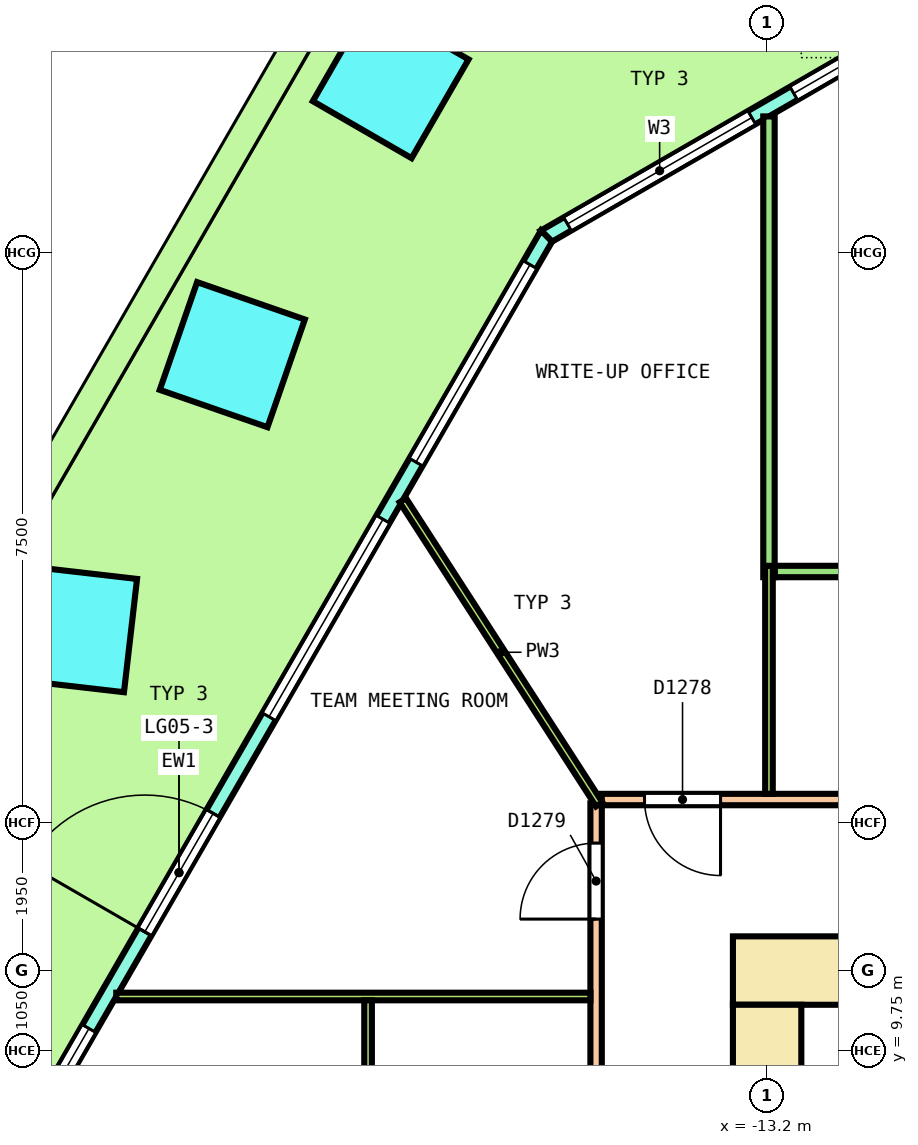
"""IFC4 building model, lengths in metres.
Left out: names, types, materials, properties, quantities, classifications, styles, units other than length and angle.
Written with IfcOpenShell. Run it as: python <this file> out.ifc"""

import sys

from ifc_helpers import new_model, si_unit, direction, frame, frame_2d, origin, origin_2d, place, context, subcontext, project, spatial, polyline, rectangle, outline, extrude, element, fill, save


model = new_model("IFC4")
c1 = context("Model", 3, precision=1e-05, world=origin(), true_north=direction((0.0, 1.0)))
c2 = subcontext(c1, "Body", "Model", "MODEL_VIEW")
j1 = project(units=[si_unit("LENGTHUNIT", "METRE"), si_unit("PLANEANGLEUNIT", "RADIAN")], contexts=[c1])
p1 = place(None, origin())
s1 = spatial("IfcSite", under=j1, at=p1, CompositionType="ELEMENT")
p2 = place(p1, origin())
s2 = spatial("IfcBuilding", under=s1, at=p2, CompositionType="ELEMENT")
p3 = place(p2, frame((0.0, 0.0, 23.4)))
s3 = spatial("IfcBuildingStorey", under=s2, at=p3, CompositionType="ELEMENT", Elevation=23.4)
p4 = place(p3, frame((-18.152, 22.512, 0.0), z_axis=(-0.036265236264, 0.0, 0.999342199969), x_axis=(-0.499424867419, -0.866167613071, -0.018123682572)))
e1 = element("IfcColumn", 1, at=p4, inside=s3, PredefinedType="COLUMN", context=c2, shape_type="SweptSolid", body=[
    extrude(rectangle(XDim=1.5, YDim=1.5, at=origin_2d()), origin(), (0.0, 0.0, 1.0), 4.053),
])
p5 = place(p3, frame((-20.236, 18.903, 0.0), z_axis=(-0.032654187208, 0.006265748099, 0.999447069363), x_axis=(-0.499519823947, -0.866234008258, -0.010889831076)))
e2 = element("IfcColumn", 2, at=p5, inside=s3, PredefinedType="COLUMN", context=c2, shape_type="SweptSolid", body=[
    extrude(rectangle(XDim=1.5, YDim=1.5, at=origin_2d()), origin(), (0.0, 0.0, 1.0), 4.052),
])
p6 = place(p3, frame((-22.32, 15.293, 0.0), z_axis=(-0.029040860623, 0.012532155622, 0.999499661576), x_axis=(-0.498795158794, -0.866712319891, -0.003625480981)))
e3 = element("IfcColumn", 3, at=p6, inside=s3, PredefinedType="COLUMN", context=c2, shape_type="SweptSolid", body=[
    extrude(rectangle(XDim=1.5, YDim=1.5, at=origin_2d()), origin(), (0.0, 0.0, 1.0), 4.052),
])
p7 = place(p3, frame((-10.149, 23.9, 0.0), z_axis=(0.0, 0.0, 1.0), x_axis=(-0.866029458321, -0.49999297727, 0.0)))
e4 = element("IfcWall", 4, at=p7, inside=s3, PredefinedType="SOLIDWALL", context=c2, shape_type="SweptSolid", body=[
    extrude(outline(polyline([(-0.027, -0.1), (1.128, -0.1), (2.282, -0.1), (3.437, -0.1), (4.592, -0.1), (5.747, -0.1), (6.901, -0.1), (6.848, 0.1), (5.711, 0.1), (4.574, 0.1), (3.437, 0.1), (2.301, 0.1), (1.164, 0.1), (0.027, 0.1), (-0.027, -0.1)])), origin(), (0.0, 0.0, 1.0), 4.1),
])
p8 = place(p7, frame((0.319, 0.0, 0.1)))
e5 = element("IfcOpeningElement", 5, at=p8, cuts=e4, PredefinedType="OPENING", context=c2, shape_type="SweptSolid", body=[
    extrude(rectangle(XDim=2.8, YDim=2.9, at=frame_2d((1.4, 1.45))), frame((0.0, 0.11, 0.0), z_axis=(0.0, -1.0, 0.0), x_axis=(1.0, 0.0, 0.0)), (0.0, 0.0, 1.0), 0.22),
])
p9 = place(p7, frame((3.756, 0.0, 0.1)))
e6 = element("IfcOpeningElement", 6, at=p9, cuts=e4, PredefinedType="OPENING", context=c2, shape_type="SweptSolid", body=[
    extrude(rectangle(XDim=2.8, YDim=2.9, at=frame_2d((1.4, 1.45))), frame((0.0, 0.11, 0.0), z_axis=(0.0, -1.0, 0.0), x_axis=(1.0, 0.0, 0.0)), (0.0, 0.0, 1.0), 0.22),
])
p10 = place(p3, frame((-16.103, 20.463, 0.0), z_axis=(0.0, 0.0, 1.0), x_axis=(-0.500000373815, -0.866025187962, 0.0)))
e7 = element("IfcWall", 7, at=p10, inside=s3, PredefinedType="SOLIDWALL", context=c2, shape_type="SweptSolid", body=[
    extrude(outline(polyline([(-0.027, -0.1), (0.994, -0.1), (2.015, -0.1), (3.035, -0.1), (4.056, -0.1), (5.077, -0.1), (6.097, -0.1), (7.118, -0.1), (8.139, -0.1), (9.16, -0.1), (10.18, -0.1), (11.201, -0.1), (12.222, -0.1), (13.242, -0.1), (14.263, -0.1), (15.284, -0.1), (16.304, -0.1), (17.325, -0.1), (18.346, -0.1), (19.367, -0.1), (19.313, 0.1), (18.298, 0.1), (17.283, 0.1), (16.268, 0.1), (15.253, 0.1), (14.238, 0.1), (13.223, 0.1), (12.208, 0.1), (11.193, 0.1), (10.177, 0.1), (9.162, 0.1), (8.147, 0.1), (7.132, 0.1), (6.117, 0.1), (5.102, 0.1), (4.087, 0.1), (3.072, 0.1), (2.057, 0.1), (1.042, 0.1), (0.027, 0.1), (-0.027, -0.1)])), origin(), (0.0, 0.0, 1.0), 4.1),
])
p11 = place(p10, frame((0.434, 0.0, 0.1)))
e8 = element("IfcOpeningElement", 8, at=p11, cuts=e7, PredefinedType="OPENING", context=c2, shape_type="SweptSolid", body=[
    extrude(rectangle(XDim=3.0, YDim=2.9, at=frame_2d((1.5, 1.45))), frame((0.0, 0.11, 0.0), z_axis=(0.0, -1.0, 0.0), x_axis=(1.0, 0.0, 0.0)), (0.0, 0.0, 1.0), 0.22),
])
p12 = place(p10, frame((4.302, 0.0, 0.1)))
e9 = element("IfcOpeningElement", 9, at=p12, cuts=e7, PredefinedType="OPENING", context=c2, shape_type="SweptSolid", body=[
    extrude(rectangle(XDim=3.0, YDim=2.9, at=frame_2d((1.5, 1.45))), frame((0.0, 0.11, 0.0), z_axis=(0.0, -1.0, 0.0), x_axis=(1.0, 0.0, 0.0)), (0.0, 0.0, 1.0), 0.22),
])
p13 = place(p10, frame((8.77, 0.0, 0.0)))
e10 = element("IfcOpeningElement", 10, at=p13, cuts=e7, PredefinedType="OPENING", context=c2, shape_type="SweptSolid", body=[
    extrude(rectangle(XDim=1.8, YDim=2.4, at=frame_2d((0.9, 1.2))), frame((0.0, 0.11, 0.0), z_axis=(0.0, -1.0, 0.0), x_axis=(1.0, 0.0, 0.0)), (0.0, 0.0, 1.0), 0.22),
])
p14 = place(p10, frame((8.77, 0.0, 2.55)))
e11 = element("IfcOpeningElement", 11, at=p14, cuts=e7, PredefinedType="OPENING", context=c2, shape_type="SweptSolid", body=[
    extrude(rectangle(XDim=1.8, YDim=0.45, at=frame_2d((0.9, 0.225))), frame((0.0, 0.11, 0.0), z_axis=(0.0, -1.0, 0.0), x_axis=(1.0, 0.0, 0.0)), (0.0, 0.0, 1.0), 0.22),
])
p15 = place(p10, frame((12.038, 0.0, 0.1)))
e12 = element("IfcOpeningElement", 12, at=p15, cuts=e7, PredefinedType="OPENING", context=c2, shape_type="SweptSolid", body=[
    extrude(rectangle(XDim=3.0, YDim=2.9, at=frame_2d((1.5, 1.45))), frame((0.0, 0.11, 0.0), z_axis=(0.0, -1.0, 0.0), x_axis=(1.0, 0.0, 0.0)), (0.0, 0.0, 1.0), 0.22),
])
p16 = place(p10, frame((15.906, 0.0, 0.1)))
e13 = element("IfcOpeningElement", 13, at=p16, cuts=e7, PredefinedType="OPENING", context=c2, shape_type="SweptSolid", body=[
    extrude(rectangle(XDim=3.0, YDim=2.9, at=frame_2d((1.5, 1.45))), frame((0.0, 0.11, 0.0), z_axis=(0.0, -1.0, 0.0), x_axis=(1.0, 0.0, 0.0)), (0.0, 0.0, 1.0), 0.22),
])
p17 = place(p3, frame((-13.65, 10.8, 0.0), z_axis=(0.0, 0.0, 1.0), x_axis=(1.0, 0.0, 0.0)))
e14 = element("IfcWall", 14, at=p17, inside=s3, PredefinedType="SHEAR", context=c2, shape_type="SweptSolid", body=[
    extrude(rectangle(XDim=27.3, YDim=0.9, at=frame_2d((13.65, 0.0))), origin(), (0.0, 0.0, 1.0), 4.1),
])
p18 = place(p17, frame((1.892, 0.0, 0.0)))
e15 = element("IfcOpeningElement", 15, at=p18, cuts=e14, PredefinedType="OPENING", context=c2, shape_type="SweptSolid", body=[
    extrude(rectangle(XDim=1.0, YDim=2.1, at=frame_2d((0.5, 1.05))), frame((0.0, 0.46, 0.0), z_axis=(0.0, -1.0, 0.0), x_axis=(1.0, 0.0, 0.0)), (0.0, 0.0, 1.0), 0.92),
])
p19 = place(p17, frame((4.97, 0.0, 0.0)))
e16 = element("IfcOpeningElement", 16, at=p19, cuts=e14, PredefinedType="OPENING", context=c2, shape_type="SweptSolid", body=[
    extrude(rectangle(XDim=1.0, YDim=2.1, at=frame_2d((0.5, 1.05))), frame((0.0, 0.46, 0.0), z_axis=(0.0, -1.0, 0.0), x_axis=(1.0, 0.0, 0.0)), (0.0, 0.0, 1.0), 0.92),
])
p20 = place(p17, frame((8.017, 0.0, 0.0)))
e17 = element("IfcOpeningElement", 17, at=p20, cuts=e14, PredefinedType="OPENING", context=c2, shape_type="SweptSolid", body=[
    extrude(rectangle(XDim=1.0, YDim=2.1, at=frame_2d((0.5, 1.05))), frame((0.0, 0.46, 0.0), z_axis=(0.0, -1.0, 0.0), x_axis=(1.0, 0.0, 0.0)), (0.0, 0.0, 1.0), 0.92),
])
p21 = place(p17, frame((11.064, 0.0, 0.0)))
e18 = element("IfcOpeningElement", 18, at=p21, cuts=e14, PredefinedType="OPENING", context=c2, shape_type="SweptSolid", body=[
    extrude(rectangle(XDim=1.0, YDim=2.1, at=frame_2d((0.5, 1.05))), frame((0.0, 0.46, 0.0), z_axis=(0.0, -1.0, 0.0), x_axis=(1.0, 0.0, 0.0)), (0.0, 0.0, 1.0), 0.92),
])
p22 = place(p17, frame((18.077, 0.0, 0.0)))
e19 = element("IfcOpeningElement", 19, at=p22, cuts=e14, PredefinedType="OPENING", context=c2, shape_type="SweptSolid", body=[
    extrude(rectangle(XDim=1.0, YDim=2.1, at=frame_2d((0.5, 1.05))), frame((0.0, 0.46, 0.0), z_axis=(0.0, -1.0, 0.0), x_axis=(1.0, 0.0, 0.0)), (0.0, 0.0, 1.0), 0.92),
])
p23 = place(p17, frame((21.206, 0.0, 0.0)))
e20 = element("IfcOpeningElement", 20, at=p23, cuts=e14, PredefinedType="OPENING", context=c2, shape_type="SweptSolid", body=[
    extrude(rectangle(XDim=1.0, YDim=2.1, at=frame_2d((0.5, 1.05))), frame((0.0, 0.46, 0.0), z_axis=(0.0, -1.0, 0.0), x_axis=(1.0, 0.0, 0.0)), (0.0, 0.0, 1.0), 0.92),
])
p24 = place(p17, frame((24.367, 0.0, 0.0)))
e21 = element("IfcOpeningElement", 21, at=p24, cuts=e14, PredefinedType="OPENING", context=c2, shape_type="SweptSolid", body=[
    extrude(rectangle(XDim=1.0, YDim=2.1, at=frame_2d((0.5, 1.05))), frame((0.0, 0.46, 0.0), z_axis=(0.0, -1.0, 0.0), x_axis=(1.0, 0.0, 0.0)), (0.0, 0.0, 1.0), 0.92),
])
p25 = place(p17, frame((14.575, 0.0, 0.0)))
e22 = element("IfcOpeningElement", 22, at=p25, cuts=e14, PredefinedType="OPENING", context=c2, shape_type="SweptSolid", body=[
    extrude(rectangle(XDim=1.4, YDim=2.1, at=frame_2d((0.7, 1.05))), frame((0.0, 0.46, 0.0), z_axis=(0.0, -1.0, 0.0), x_axis=(1.0, 0.0, 0.0)), (0.0, 0.0, 1.0), 0.92),
])
p26 = place(p3, frame((-13.2, -10.35, 0.0), z_axis=(0.0, 0.0, 1.0), x_axis=(0.0, 1.0, 0.0)))
e23 = element("IfcWall", 23, at=p26, inside=s3, PredefinedType="SHEAR", context=c2, shape_type="SweptSolid", body=[
    extrude(rectangle(XDim=20.7, YDim=0.9, at=frame_2d((10.35, 0.0))), origin(), (0.0, 0.0, 1.0), 4.1),
])
p27 = place(p26, frame((9.15, 0.0, 0.0)))
e24 = element("IfcOpeningElement", 24, at=p27, cuts=e23, PredefinedType="OPENING", context=c2, shape_type="SweptSolid", body=[
    extrude(rectangle(XDim=2.4, YDim=2.1, at=frame_2d((1.2, 1.05))), frame((0.0, 0.46, 0.0), z_axis=(0.0, -1.0, 0.0), x_axis=(1.0, 0.0, 0.0)), (0.0, 0.0, 1.0), 0.92),
])
p28 = place(p26, frame((16.05, 0.0, 0.0)))
e25 = element("IfcOpeningElement", 25, at=p28, cuts=e23, PredefinedType="OPENING", context=c2, shape_type="SweptSolid", body=[
    extrude(rectangle(XDim=1.2, YDim=2.1, at=frame_2d((0.6, 1.05))), frame((0.0, 0.46, 0.0), z_axis=(0.0, -1.0, 0.0), x_axis=(1.0, 0.0, 0.0)), (0.0, 0.0, 1.0), 0.92),
])
p29 = place(p26, frame((3.45, 0.0, 0.0)))
e26 = element("IfcOpeningElement", 26, at=p29, cuts=e23, PredefinedType="OPENING", context=c2, shape_type="SweptSolid", body=[
    extrude(rectangle(XDim=1.2, YDim=2.1, at=frame_2d((0.6, 1.05))), frame((0.0, 0.46, 0.0), z_axis=(0.0, -1.0, 0.0), x_axis=(1.0, 0.0, 0.0)), (0.0, 0.0, 1.0), 0.92),
])
p30 = place(p3, frame((-15.375, 13.05, 0.0), z_axis=(0.0, 0.0, 1.0), x_axis=(1.0, 0.0, 0.0)))
e27 = element("IfcWall", 27, at=p30, inside=s3, PredefinedType="PARTITIONING", context=c2, shape_type="SweptSolid", body=[
    extrude(rectangle(XDim=30.75, YDim=0.15, at=frame_2d((15.375, 0.0))), origin(), (0.0, 0.0, 1.0), 3.05),
])
p31 = place(p30, frame((28.224, 0.0, 0.0)))
e28 = element("IfcOpeningElement", 28, at=p31, cuts=e27, PredefinedType="OPENING", context=c2, shape_type="SweptSolid", body=[
    extrude(rectangle(XDim=1.0, YDim=2.1, at=frame_2d((0.5, 1.05))), frame((0.0, 0.085, 0.0), z_axis=(0.0, -1.0, 0.0), x_axis=(1.0, 0.0, 0.0)), (0.0, 0.0, 1.0), 0.17),
])
p32 = place(p30, frame((23.241, 0.0, 0.0)))
e29 = element("IfcOpeningElement", 29, at=p32, cuts=e27, PredefinedType="OPENING", context=c2, shape_type="SweptSolid", body=[
    extrude(rectangle(XDim=1.2, YDim=2.1, at=frame_2d((0.6, 1.05))), frame((0.0, 0.085, 0.0), z_axis=(0.0, -1.0, 0.0), x_axis=(1.0, 0.0, 0.0)), (0.0, 0.0, 1.0), 0.17),
])
p33 = place(p30, frame((17.746, 0.0, 0.0)))
e30 = element("IfcOpeningElement", 30, at=p33, cuts=e27, PredefinedType="OPENING", context=c2, shape_type="SweptSolid", body=[
    extrude(rectangle(XDim=1.2, YDim=2.1, at=frame_2d((0.6, 1.05))), frame((0.0, 0.085, 0.0), z_axis=(0.0, -1.0, 0.0), x_axis=(1.0, 0.0, 0.0)), (0.0, 0.0, 1.0), 0.17),
])
p34 = place(p30, frame((11.247, 0.0, 0.0)))
e31 = element("IfcOpeningElement", 31, at=p34, cuts=e27, PredefinedType="OPENING", context=c2, shape_type="SweptSolid", body=[
    extrude(rectangle(XDim=1.2, YDim=2.1, at=frame_2d((0.6, 1.05))), frame((0.0, 0.085, 0.0), z_axis=(0.0, -1.0, 0.0), x_axis=(1.0, 0.0, 0.0)), (0.0, 0.0, 1.0), 0.17),
])
p35 = place(p30, frame((6.577, 0.0, 0.0)))
e32 = element("IfcOpeningElement", 32, at=p35, cuts=e27, PredefinedType="OPENING", context=c2, shape_type="SweptSolid", body=[
    extrude(rectangle(XDim=1.0, YDim=2.1, at=frame_2d((0.5, 1.05))), frame((0.0, 0.085, 0.0), z_axis=(0.0, -1.0, 0.0), x_axis=(1.0, 0.0, 0.0)), (0.0, 0.0, 1.0), 0.17),
])
p36 = place(p30, frame((0.562, 0.0, 0.0)))
e33 = element("IfcOpeningElement", 33, at=p36, cuts=e27, PredefinedType="OPENING", context=c2, shape_type="SweptSolid", body=[
    extrude(rectangle(XDim=1.0, YDim=2.1, at=frame_2d((0.5, 1.05))), frame((0.0, 0.085, 0.0), z_axis=(0.0, -1.0, 0.0), x_axis=(1.0, 0.0, 0.0)), (0.0, 0.0, 1.0), 0.17),
])
p37 = place(p3, frame((-15.45, -12.975, 0.0), z_axis=(0.0, 0.0, 1.0), x_axis=(0.0, 1.0, 0.0)))
e34 = element("IfcWall", 34, at=p37, inside=s3, PredefinedType="PARTITIONING", context=c2, shape_type="SweptSolid", body=[
    extrude(rectangle(XDim=25.975, YDim=0.15, at=frame_2d((12.988, 0.0))), origin(), (0.0, 0.0, 1.0), 3.05),
])
p38 = place(p37, frame((24.452, 0.0, 0.0)))
e35 = element("IfcOpeningElement", 35, at=p38, cuts=e34, PredefinedType="OPENING", context=c2, shape_type="SweptSolid", body=[
    extrude(rectangle(XDim=1.0, YDim=2.1, at=frame_2d((0.5, 1.05))), frame((0.0, 0.085, 0.0), z_axis=(0.0, -1.0, 0.0), x_axis=(1.0, 0.0, 0.0)), (0.0, 0.0, 1.0), 0.17),
])
p39 = place(p37, frame((15.722, 0.0, 0.0)))
e36 = element("IfcOpeningElement", 36, at=p39, cuts=e34, PredefinedType="OPENING", context=c2, shape_type="SweptSolid", body=[
    extrude(rectangle(XDim=1.0, YDim=2.1, at=frame_2d((0.5, 1.05))), frame((0.0, 0.085, 0.0), z_axis=(0.0, -1.0, 0.0), x_axis=(1.0, 0.0, 0.0)), (0.0, 0.0, 1.0), 0.17),
])
p40 = place(p37, frame((7.494, 0.0, 0.0)))
e37 = element("IfcOpeningElement", 37, at=p40, cuts=e34, PredefinedType="OPENING", context=c2, shape_type="SweptSolid", body=[
    extrude(rectangle(XDim=1.0, YDim=2.1, at=frame_2d((0.5, 1.05))), frame((0.0, 0.085, 0.0), z_axis=(0.0, -1.0, 0.0), x_axis=(1.0, 0.0, 0.0)), (0.0, 0.0, 1.0), 0.17),
])
p41 = place(p37, frame((0.664, 0.0, 0.0)))
e38 = element("IfcOpeningElement", 38, at=p41, cuts=e34, PredefinedType="OPENING", context=c2, shape_type="SweptSolid", body=[
    extrude(rectangle(XDim=1.0, YDim=2.1, at=frame_2d((0.5, 1.05))), frame((0.0, 0.085, 0.0), z_axis=(0.0, -1.0, 0.0), x_axis=(1.0, 0.0, 0.0)), (0.0, 0.0, 1.0), 0.17),
])
p42 = place(p3, frame((-13.101, 16.05, 0.0), z_axis=(0.0, 0.0, 1.0), x_axis=(1.0, 0.0, 0.0)))
e39 = element("IfcWall", 39, at=p42, inside=s3, PredefinedType="PARTITIONING", context=c2, shape_type="SweptSolid", body=[
    extrude(rectangle(XDim=6.92, YDim=0.15, at=frame_2d((3.46, 0.0))), origin(), (0.0, 0.0, 1.0), 3.05),
])
p43 = place(p3, frame((-13.176, 15.975, 0.0), z_axis=(0.0, 0.0, 1.0), x_axis=(0.0, 1.0, 0.0)))
e40 = element("IfcWall", 40, at=p43, inside=s3, PredefinedType="PARTITIONING", context=c2, shape_type="SweptSolid", body=[
    extrude(rectangle(XDim=6.062, YDim=0.15, at=frame_2d((3.031, 0.0))), origin(), (0.0, 0.0, 1.0), 3.05),
])
p44 = place(p3, frame((-13.176, 13.125, 0.0), z_axis=(0.0, 0.0, 1.0), x_axis=(0.0, 1.0, 0.0)))
e41 = element("IfcWall", 41, at=p44, inside=s3, PredefinedType="PARTITIONING", context=c2, shape_type="SweptSolid", body=[
    extrude(rectangle(XDim=3.0, YDim=0.1, at=frame_2d((1.5, 0.0))), origin(), (0.0, 0.0, 1.0), 3.05),
])
p45 = place(p3, frame((-17.993, 16.988, 0.0), z_axis=(0.0, 0.0, 1.0), x_axis=(0.542528445802, -0.840037431009, 0.0)))
e42 = element("IfcWall", 42, at=p45, inside=s3, PredefinedType="PARTITIONING", context=c2, shape_type="SweptSolid", body=[
    extrude(rectangle(XDim=4.763, YDim=0.1, at=frame_2d((2.381, 0.0))), origin(), (0.0, 0.0, 1.0), 3.05),
])
p46 = place(p3, frame((-21.763, 10.459, 0.0), z_axis=(0.0, 0.0, 1.0), x_axis=(1.0, 0.0, 0.0)))
e43 = element("IfcWall", 43, at=p46, inside=s3, PredefinedType="PARTITIONING", context=c2, shape_type="SweptSolid", body=[
    extrude(rectangle(XDim=6.238, YDim=0.1, at=frame_2d((3.119, 0.0))), origin(), (0.0, 0.0, 1.0), 3.05),
])
p47 = place(p3, frame((-18.45, 0.327, 0.0), z_axis=(0.0, 0.0, 1.0), x_axis=(0.0, 1.0, 0.0)))
e44 = element("IfcWall", 44, at=p47, inside=s3, PredefinedType="PARTITIONING", context=c2, shape_type="SweptSolid", body=[
    extrude(rectangle(XDim=10.082, YDim=0.1, at=frame_2d((5.041, 0.0))), origin(), (0.0, 0.0, 1.0), 3.05),
])
p48 = place(p47, frame((6.512, 0.0, 0.0)))
e45 = element("IfcOpeningElement", 45, at=p48, cuts=e44, PredefinedType="OPENING", context=c2, shape_type="SweptSolid", body=[
    extrude(rectangle(XDim=1.2, YDim=2.1, at=frame_2d((0.6, 1.05))), frame((0.0, 0.06, 0.0), z_axis=(0.0, -1.0, 0.0), x_axis=(1.0, 0.0, 0.0)), (0.0, 0.0, 1.0), 0.12),
])
p49 = place(p8, origin())
e46 = element("IfcWindow", 46, at=p49, inside=s3, PartitioningType="SINGLE_PANEL", PredefinedType="WINDOW", context=c2, shape_type="SweptSolid", body=[
    extrude(rectangle(XDim=2.8, YDim=2.9, at=frame_2d((1.4, 1.45))), frame((0.0, 0.03, 0.0), z_axis=(0.0, -1.0, 0.0), x_axis=(1.0, 0.0, 0.0)), (0.0, 0.0, 1.0), 0.06),
])
fill(e5, e46)
p50 = place(p9, origin())
e47 = element("IfcWindow", 47, at=p50, inside=s3, PartitioningType="SINGLE_PANEL", PredefinedType="WINDOW", context=c2, shape_type="SweptSolid", body=[
    extrude(rectangle(XDim=2.8, YDim=2.9, at=frame_2d((1.4, 1.45))), frame((0.0, 0.03, 0.0), z_axis=(0.0, -1.0, 0.0), x_axis=(1.0, 0.0, 0.0)), (0.0, 0.0, 1.0), 0.06),
])
fill(e6, e47)
p51 = place(p11, origin())
e48 = element("IfcWindow", 48, at=p51, inside=s3, PartitioningType="SINGLE_PANEL", PredefinedType="WINDOW", context=c2, shape_type="SweptSolid", body=[
    extrude(rectangle(XDim=3.0, YDim=2.9, at=frame_2d((1.5, 1.45))), frame((0.0, 0.03, 0.0), z_axis=(0.0, -1.0, 0.0), x_axis=(1.0, 0.0, 0.0)), (0.0, 0.0, 1.0), 0.06),
])
fill(e8, e48)
p52 = place(p12, origin())
e49 = element("IfcWindow", 49, at=p52, inside=s3, PartitioningType="SINGLE_PANEL", PredefinedType="WINDOW", context=c2, shape_type="SweptSolid", body=[
    extrude(rectangle(XDim=3.0, YDim=2.9, at=frame_2d((1.5, 1.45))), frame((0.0, 0.03, 0.0), z_axis=(0.0, -1.0, 0.0), x_axis=(1.0, 0.0, 0.0)), (0.0, 0.0, 1.0), 0.06),
])
fill(e9, e49)
p53 = place(p13, origin())
e50 = element("IfcDoor", 50, at=p53, inside=s3, OperationType="DOUBLE_DOOR_SINGLE_SWING", PredefinedType="DOOR", context=c2, shape_type="SweptSolid", body=[
    extrude(rectangle(XDim=1.8, YDim=2.4, at=frame_2d((0.9, 1.2))), frame((0.0, 0.025, 0.0), z_axis=(0.0, -1.0, 0.0), x_axis=(1.0, 0.0, 0.0)), (0.0, 0.0, 1.0), 0.05),
])
fill(e10, e50)
p54 = place(p14, origin())
e51 = element("IfcWindow", 51, at=p54, inside=s3, PartitioningType="SINGLE_PANEL", PredefinedType="WINDOW", context=c2, shape_type="SweptSolid", body=[
    extrude(rectangle(XDim=1.8, YDim=0.45, at=frame_2d((0.9, 0.225))), frame((0.0, 0.03, 0.0), z_axis=(0.0, -1.0, 0.0), x_axis=(1.0, 0.0, 0.0)), (0.0, 0.0, 1.0), 0.06),
])
fill(e11, e51)
p55 = place(p15, origin())
e52 = element("IfcWindow", 52, at=p55, inside=s3, PartitioningType="SINGLE_PANEL", PredefinedType="WINDOW", context=c2, shape_type="SweptSolid", body=[
    extrude(rectangle(XDim=3.0, YDim=2.9, at=frame_2d((1.5, 1.45))), frame((0.0, 0.03, 0.0), z_axis=(0.0, -1.0, 0.0), x_axis=(1.0, 0.0, 0.0)), (0.0, 0.0, 1.0), 0.06),
])
fill(e12, e52)
p56 = place(p36, origin())
e53 = element("IfcDoor", 53, at=p56, inside=s3, OperationType="SINGLE_SWING_LEFT", PredefinedType="DOOR", context=c2, shape_type="SweptSolid", body=[
    extrude(rectangle(XDim=1.0, YDim=2.1, at=frame_2d((0.5, 1.05))), frame((0.0, 0.025, 0.0), z_axis=(0.0, -1.0, 0.0), x_axis=(1.0, 0.0, 0.0)), (0.0, 0.0, 1.0), 0.05),
])
fill(e33, e53)
p57 = place(p38, origin())
e54 = element("IfcDoor", 54, at=p57, inside=s3, OperationType="SINGLE_SWING_LEFT", PredefinedType="DOOR", context=c2, shape_type="SweptSolid", body=[
    extrude(rectangle(XDim=1.0, YDim=2.1, at=frame_2d((0.5, 1.05))), frame((0.0, 0.025, 0.0), z_axis=(0.0, -1.0, 0.0), x_axis=(1.0, 0.0, 0.0)), (0.0, 0.0, 1.0), 0.05),
])
fill(e35, e54)
save(model, sys.argv[1])
